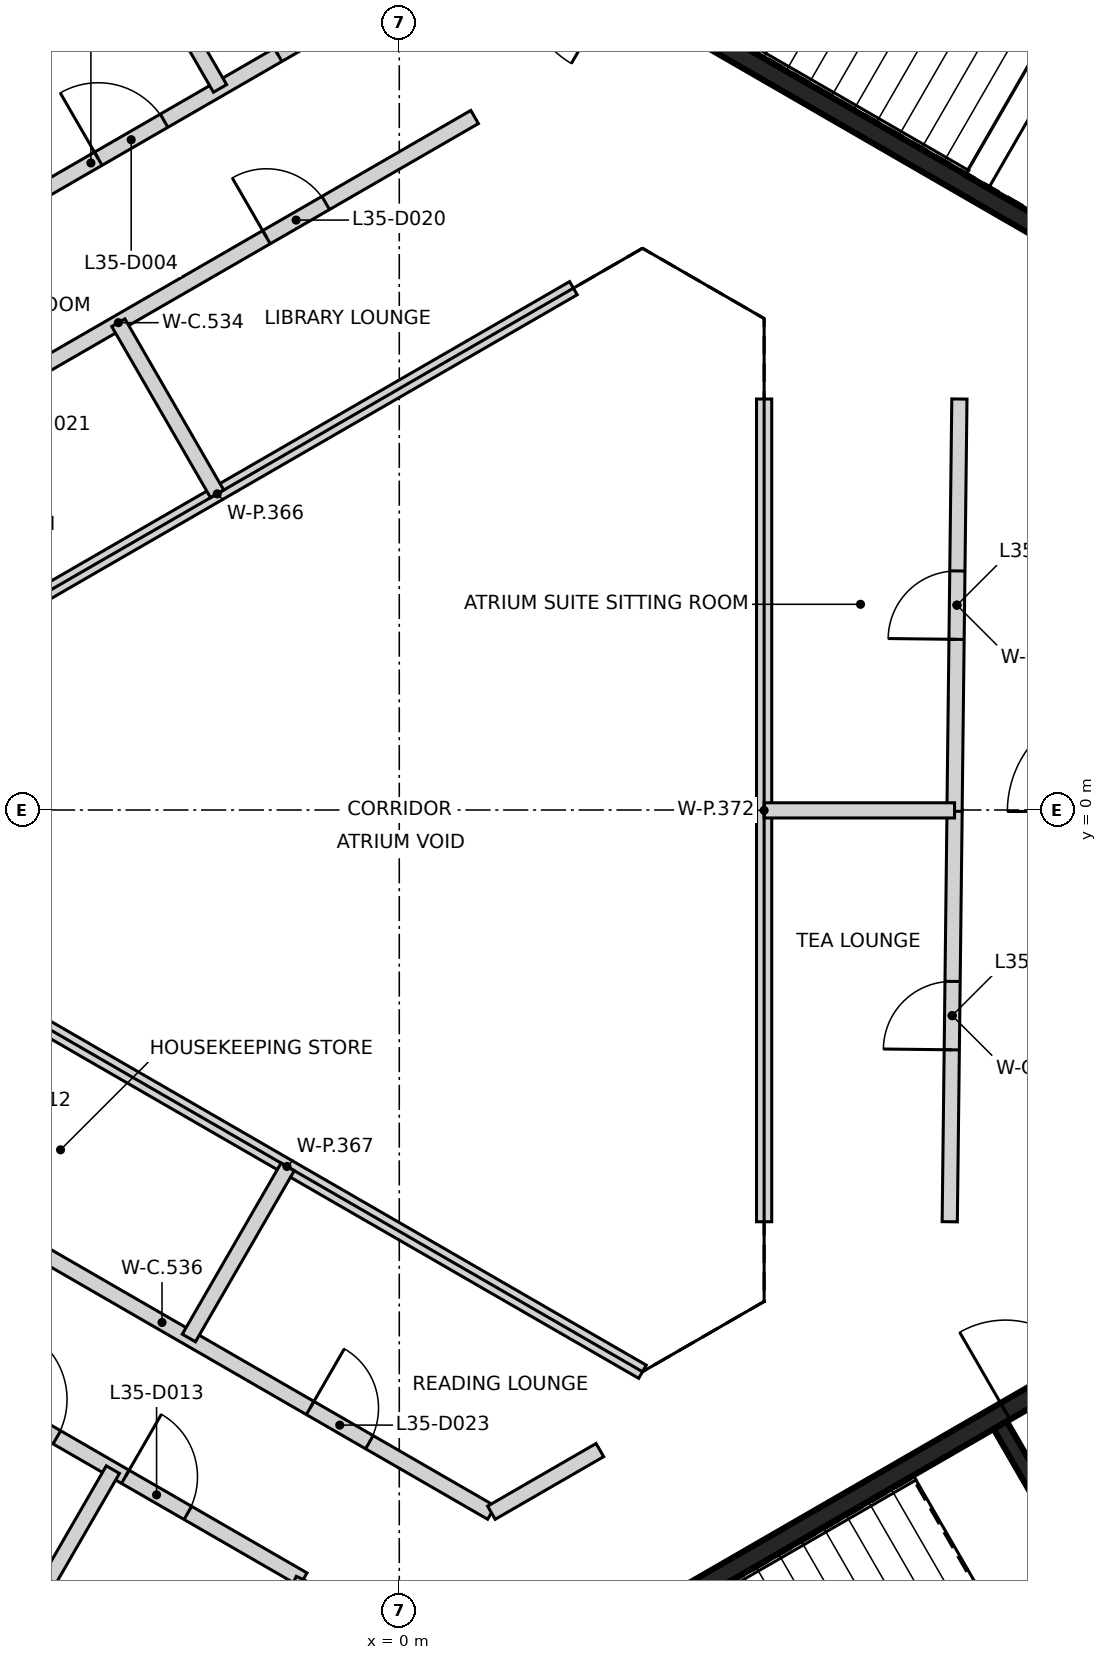
"""IFC4 building model, lengths in metres.
Left out: names, types, materials, properties, quantities, classifications, styles, units other than length and angle.
Written with IfcOpenShell. Run it as: python <this file> out.ifc"""

import sys

from ifc_helpers import new_model, si_unit, direction, frame, frame_2d, origin, place, context, subcontext, project, spatial, rectangle, extrude, element, fill, save


model = new_model("IFC4")
c1 = context("Model", 3, precision=1e-05, world=origin(), true_north=direction((0.0, 1.0)))
c2 = subcontext(c1, "Body", "Model", "MODEL_VIEW")
j1 = project(units=[si_unit("LENGTHUNIT", "METRE"), si_unit("PLANEANGLEUNIT", "RADIAN")], contexts=[c1])
p1 = place(None, origin())
s1 = spatial("IfcSite", under=j1, at=p1, CompositionType="ELEMENT")
p2 = place(p1, origin())
s2 = spatial("IfcBuilding", under=s1, at=p2, CompositionType="ELEMENT")
p3 = place(p2, frame((0.0, 0.0, 143.2)))
s3 = spatial("IfcBuildingStorey", under=s2, at=p3, CompositionType="ELEMENT", Elevation=143.2)
p4 = place(p3, frame((10.42, 6.498, 0.0), z_axis=(0.0, 0.0, 1.0), x_axis=(-0.866021906294, 0.500006057782, 0.0)))
e1 = element("IfcWall", 1, at=p4, inside=s3, PredefinedType="SHEAR", context=c2, shape_type="SweptSolid", body=[
    extrude(rectangle(XDim=11.55, YDim=0.25, at=frame_2d((5.775, 0.0))), origin(), (0.0, 0.0, 1.0), 3.2),
])
p5 = place(p4, frame((10.025, 0.0, 0.0)))
e2 = element("IfcOpeningElement", 2, at=p5, cuts=e1, PredefinedType="OPENING", context=c2, shape_type="SweptSolid", body=[
    extrude(rectangle(XDim=1.2, YDim=2.1, at=frame_2d((0.6, 1.05))), frame((0.0, 0.135, 0.0), z_axis=(0.0, -1.0, 0.0), x_axis=(1.0, 0.0, 0.0)), (0.0, 0.0, 1.0), 0.27),
])
p6 = place(p4, frame((8.725, 0.0, 0.0)))
e3 = element("IfcOpeningElement", 3, at=p6, cuts=e1, PredefinedType="OPENING", context=c2, shape_type="SweptSolid", body=[
    extrude(rectangle(XDim=1.2, YDim=2.1, at=frame_2d((0.6, 1.05))), frame((0.0, 0.135, 0.0), z_axis=(0.0, -1.0, 0.0), x_axis=(1.0, 0.0, 0.0)), (0.0, 0.0, 1.0), 0.27),
])
p7 = place(p3, frame((0.417, -12.273, 0.0), z_axis=(0.0, 0.0, 1.0), x_axis=(0.866021906294, 0.500006057782, 0.0)))
e4 = element("IfcWall", 4, at=p7, inside=s3, PredefinedType="SHEAR", context=c2, shape_type="SweptSolid", body=[
    extrude(rectangle(XDim=11.55, YDim=0.25, at=frame_2d((5.775, 0.0))), origin(), (0.0, 0.0, 1.0), 3.2),
])
p8 = place(p7, frame((10.025, 0.0, 0.0)))
e5 = element("IfcOpeningElement", 5, at=p8, cuts=e4, PredefinedType="OPENING", context=c2, shape_type="SweptSolid", body=[
    extrude(rectangle(XDim=1.2, YDim=2.1, at=frame_2d((0.6, 1.05))), frame((0.0, 0.135, 0.0), z_axis=(0.0, -1.0, 0.0), x_axis=(1.0, 0.0, 0.0)), (0.0, 0.0, 1.0), 0.27),
])
p9 = place(p7, frame((8.725, 0.0, 0.0)))
e6 = element("IfcOpeningElement", 6, at=p9, cuts=e4, PredefinedType="OPENING", context=c2, shape_type="SweptSolid", body=[
    extrude(rectangle(XDim=1.2, YDim=2.1, at=frame_2d((0.6, 1.05))), frame((0.0, 0.135, 0.0), z_axis=(0.0, -1.0, 0.0), x_axis=(1.0, 0.0, 0.0)), (0.0, 0.0, 1.0), 0.27),
])
p10 = place(p3, frame((7.906, -8.094, 0.0), z_axis=(0.0, 0.0, 1.0), x_axis=(0.500024287448, -0.866011380966, 0.0)))
e7 = element("IfcWall", 7, at=p10, inside=s3, PredefinedType="SHEAR", context=c2, shape_type="SweptSolid", body=[
    extrude(rectangle(XDim=5.251, YDim=0.2, at=frame_2d((2.625, 0.0))), origin(), (0.0, 0.0, 1.0), 3.2),
])
p11 = place(p10, frame((1.849, 0.0, 0.0)))
e8 = element("IfcOpeningElement", 8, at=p11, cuts=e7, PredefinedType="OPENING", context=c2, shape_type="SweptSolid", body=[
    extrude(rectangle(XDim=1.4, YDim=2.1, at=frame_2d((0.7, 1.05))), frame((0.0, 0.11, 0.0), z_axis=(0.0, -1.0, 0.0), x_axis=(1.0, 0.0, 0.0)), (0.0, 0.0, 1.0), 0.22),
])
p12 = place(p3, frame((-9.447, -5.4, 0.0), z_axis=(0.0, 0.0, 1.0), x_axis=(0.866101262146, -0.49986858644, 0.0)))
e9 = element("IfcWall", 9, at=p12, inside=s3, PredefinedType="PARTITIONING", context=c2, shape_type="SweptSolid", body=[
    extrude(rectangle(XDim=9.449, YDim=0.2, at=frame_2d((4.724, 0.0))), origin(), (0.0, 0.0, 1.0), 3.2),
])
p13 = place(p12, frame((2.718, 0.0, 0.0)))
e10 = element("IfcOpeningElement", 10, at=p13, cuts=e9, PredefinedType="OPENING", context=c2, shape_type="SweptSolid", body=[
    extrude(rectangle(XDim=0.95, YDim=2.1, at=frame_2d((0.475, 1.05))), frame((0.0, 0.11, 0.0), z_axis=(0.0, -1.0, 0.0), x_axis=(1.0, 0.0, 0.0)), (0.0, 0.0, 1.0), 0.22),
])
p14 = place(p12, frame((4.707, 0.0, 0.0)))
e11 = element("IfcOpeningElement", 11, at=p14, cuts=e9, PredefinedType="OPENING", context=c2, shape_type="SweptSolid", body=[
    extrude(rectangle(XDim=1.0, YDim=2.1, at=frame_2d((0.5, 1.05))), frame((0.0, 0.11, 0.0), z_axis=(0.0, -1.0, 0.0), x_axis=(1.0, 0.0, 0.0)), (0.0, 0.0, 1.0), 0.22),
])
p15 = place(p12, frame((6.746, 0.0, 0.0)))
e12 = element("IfcOpeningElement", 12, at=p15, cuts=e9, PredefinedType="OPENING", context=c2, shape_type="SweptSolid", body=[
    extrude(rectangle(XDim=0.95, YDim=2.1, at=frame_2d((0.475, 1.05))), frame((0.0, 0.11, 0.0), z_axis=(0.0, -1.0, 0.0), x_axis=(1.0, 0.0, 0.0)), (0.0, 0.0, 1.0), 0.22),
])
p16 = place(p3, frame((-8.382, 3.705, 0.0), z_axis=(0.0, 0.0, 1.0), x_axis=(0.866012036978, 0.500023151273, 0.0)))
e13 = element("IfcWall", 13, at=p16, inside=s3, PredefinedType="PARTITIONING", context=c2, shape_type="SweptSolid", body=[
    extrude(rectangle(XDim=10.823, YDim=0.2, at=frame_2d((5.412, 0.0))), origin(), (0.0, 0.0, 1.0), 3.2),
])
p17 = place(p16, frame((7.661, 0.0, 0.0)))
e14 = element("IfcOpeningElement", 14, at=p17, cuts=e13, PredefinedType="OPENING", context=c2, shape_type="SweptSolid", body=[
    extrude(rectangle(XDim=0.9, YDim=2.1, at=frame_2d((0.45, 1.05))), frame((0.0, 0.11, 0.0), z_axis=(0.0, -1.0, 0.0), x_axis=(1.0, 0.0, 0.0)), (0.0, 0.0, 1.0), 0.22),
])
p18 = place(p16, frame((2.261, 0.0, 0.0)))
e15 = element("IfcOpeningElement", 15, at=p18, cuts=e13, PredefinedType="OPENING", context=c2, shape_type="SweptSolid", body=[
    extrude(rectangle(XDim=0.9, YDim=2.1, at=frame_2d((0.45, 1.05))), frame((0.0, 0.11, 0.0), z_axis=(0.0, -1.0, 0.0), x_axis=(1.0, 0.0, 0.0)), (0.0, 0.0, 1.0), 0.22),
])
p19 = place(p3, frame((-8.161, 6.142, 0.0), z_axis=(0.0, 0.0, 1.0), x_axis=(0.865927304867, 0.500169873828, 0.0)))
e16 = element("IfcWall", 16, at=p19, inside=s3, PredefinedType="PARTITIONING", context=c2, shape_type="SweptSolid", body=[
    extrude(rectangle(XDim=9.478, YDim=0.2, at=frame_2d((4.739, 0.0))), origin(), (0.0, 0.0, 1.0), 3.2),
])
p20 = place(p19, frame((4.851, 0.0, 0.0)))
e17 = element("IfcOpeningElement", 17, at=p20, cuts=e16, PredefinedType="OPENING", context=c2, shape_type="SweptSolid", body=[
    extrude(rectangle(XDim=1.0, YDim=2.1, at=frame_2d((0.5, 1.05))), frame((0.0, 0.11, 0.0), z_axis=(0.0, -1.0, 0.0), x_axis=(1.0, 0.0, 0.0)), (0.0, 0.0, 1.0), 0.22),
])
p21 = place(p19, frame((7.583, 0.0, 0.0)))
e18 = element("IfcOpeningElement", 18, at=p21, cuts=e16, PredefinedType="OPENING", context=c2, shape_type="SweptSolid", body=[
    extrude(rectangle(XDim=1.0, YDim=2.1, at=frame_2d((0.5, 1.05))), frame((0.0, 0.11, 0.0), z_axis=(0.0, -1.0, 0.0), x_axis=(1.0, 0.0, 0.0)), (0.0, 0.0, 1.0), 0.22),
])
p22 = place(p3, frame((-7.455, -4.24, 0.0), z_axis=(0.0, 0.0, 1.0), x_axis=(0.866015783746, -0.500016662025, 0.0)))
e19 = element("IfcWall", 19, at=p22, inside=s3, PredefinedType="PARTITIONING", context=c2, shape_type="SweptSolid", body=[
    extrude(rectangle(XDim=10.009, YDim=0.2, at=frame_2d((5.004, 0.0))), origin(), (0.0, 0.0, 1.0), 3.2),
])
p23 = place(p22, frame((2.262, 0.0, 0.0)))
e20 = element("IfcOpeningElement", 20, at=p23, cuts=e19, PredefinedType="OPENING", context=c2, shape_type="SweptSolid", body=[
    extrude(rectangle(XDim=0.9, YDim=2.1, at=frame_2d((0.45, 1.05))), frame((0.0, 0.11, 0.0), z_axis=(0.0, -1.0, 0.0), x_axis=(1.0, 0.0, 0.0)), (0.0, 0.0, 1.0), 0.22),
])
p24 = place(p22, frame((7.254, 0.0, 0.0)))
e21 = element("IfcOpeningElement", 21, at=p24, cuts=e19, PredefinedType="OPENING", context=c2, shape_type="SweptSolid", body=[
    extrude(rectangle(XDim=0.9, YDim=2.1, at=frame_2d((0.45, 1.05))), frame((0.0, 0.11, 0.0), z_axis=(0.0, -1.0, 0.0), x_axis=(1.0, 0.0, 0.0)), (0.0, 0.0, 1.0), 0.22),
])
p25 = place(p3, frame((-2.162, -12.041, 0.0), z_axis=(0.0, 0.0, 1.0), x_axis=(0.424280226728, 0.905530943264, 0.0)))
e22 = element("IfcWall", 22, at=p25, inside=s3, PredefinedType="PARTITIONING", context=c2, shape_type="SweptSolid", body=[
    extrude(rectangle(XDim=2.117, YDim=0.2, at=frame_2d((1.059, 0.0))), origin(), (0.0, 0.0, 1.0), 3.2),
])
p26 = place(p3, frame((1.212, -9.245, 0.0), z_axis=(0.0, 0.0, 1.0), x_axis=(0.86593636949, 0.500154180222, 0.0)))
e23 = element("IfcWall", 23, at=p26, inside=s3, PredefinedType="PARTITIONING", context=c2, shape_type="SweptSolid", body=[
    extrude(rectangle(XDim=1.648, YDim=0.2, at=frame_2d((0.824, 0.0))), origin(), (0.0, 0.0, 1.0), 3.2),
])
p27 = place(p3, frame((7.242, -5.417, 0.0), z_axis=(0.0, 0.0, 1.0), x_axis=(0.01179195138, 0.999930472524, 0.0)))
e24 = element("IfcWall", 24, at=p27, inside=s3, PredefinedType="PARTITIONING", context=c2, shape_type="SweptSolid", body=[
    extrude(rectangle(XDim=5.425, YDim=0.2, at=frame_2d((2.712, 0.0))), origin(), (0.0, 0.0, 1.0), 3.2),
])
p28 = place(p27, frame((2.262, 0.0, 0.0)))
e25 = element("IfcOpeningElement", 25, at=p28, cuts=e24, PredefinedType="OPENING", context=c2, shape_type="SweptSolid", body=[
    extrude(rectangle(XDim=0.9, YDim=2.1, at=frame_2d((0.45, 1.05))), frame((0.0, 0.11, 0.0), z_axis=(0.0, -1.0, 0.0), x_axis=(1.0, 0.0, 0.0)), (0.0, 0.0, 1.0), 0.22),
])
p29 = place(p3, frame((7.305, -0.017, 0.0), z_axis=(0.0, 0.0, 1.0), x_axis=(0.01179195138, 0.999930472524, 0.0)))
e26 = element("IfcWall", 26, at=p29, inside=s3, PredefinedType="PARTITIONING", context=c2, shape_type="SweptSolid", body=[
    extrude(rectangle(XDim=5.425, YDim=0.2, at=frame_2d((2.712, 0.0))), origin(), (0.0, 0.0, 1.0), 3.2),
])
p30 = place(p29, frame((2.262, 0.0, 0.0)))
e27 = element("IfcOpeningElement", 27, at=p30, cuts=e26, PredefinedType="OPENING", context=c2, shape_type="SweptSolid", body=[
    extrude(rectangle(XDim=0.9, YDim=2.1, at=frame_2d((0.45, 1.05))), frame((0.0, 0.11, 0.0), z_axis=(0.0, -1.0, 0.0), x_axis=(1.0, 0.0, 0.0)), (0.0, 0.0, 1.0), 0.22),
])
p31 = place(p3, frame((-9.882, -19.267, 0.0), z_axis=(0.0, 0.0, 1.0), x_axis=(0.499993811829, 0.866028976497, 0.0)))
e28 = element("IfcWall", 28, at=p31, inside=s3, PredefinedType="PARTITIONING", context=c2, shape_type="SweptSolid", body=[
    extrude(rectangle(XDim=12.227, YDim=0.2, at=frame_2d((6.114, 0.0))), origin(), (0.0, 0.0, 1.0), 2.3),
])
p32 = place(p3, frame((-8.468, 20.076, 0.0), z_axis=(0.0, 0.0, 1.0), x_axis=(0.499961688474, -0.866047521824, 0.0)))
e29 = element("IfcWall", 29, at=p32, inside=s3, PredefinedType="PARTITIONING", context=c2, shape_type="SweptSolid", body=[
    extrude(rectangle(XDim=12.22, YDim=0.2, at=frame_2d((6.11, 0.0))), origin(), (0.0, 0.0, 1.0), 2.3),
])
p33 = place(p3, frame((-7.082, 1.453, 0.0), z_axis=(0.0, 0.0, 1.0), x_axis=(0.866010525116, 0.500025769724, 0.0)))
e30 = element("IfcWall", 30, at=p33, inside=s3, PredefinedType="PARTITIONING", context=c2, shape_type="SweptSolid", body=[
    extrude(rectangle(XDim=10.823, YDim=0.2, at=frame_2d((5.411, 0.0))), origin(), (0.0, 0.0, 1.0), 2.3),
])
p34 = place(p3, frame((-6.155, -1.989, 0.0), z_axis=(0.0, 0.0, 1.0), x_axis=(0.866009062299, -0.500028303215, 0.0)))
e31 = element("IfcWall", 31, at=p34, inside=s3, PredefinedType="PARTITIONING", context=c2, shape_type="SweptSolid", body=[
    extrude(rectangle(XDim=10.802, YDim=0.2, at=frame_2d((5.401, 0.0))), origin(), (0.0, 0.0, 1.0), 2.3),
])
p35 = place(p3, frame((-3.696, 6.411, 0.0), z_axis=(0.0, 0.0, 1.0), x_axis=(0.500006934395, -0.866021400173, 0.0)))
e32 = element("IfcWall", 32, at=p35, inside=s3, PredefinedType="PARTITIONING", context=c2, shape_type="SweptSolid", body=[
    extrude(rectangle(XDim=2.6, YDim=0.2, at=frame_2d((1.3, 0.0))), origin(), (0.0, 0.0, 1.0), 2.3),
])
p36 = place(p3, frame((-2.768, -6.946, 0.0), z_axis=(0.0, 0.0, 1.0), x_axis=(0.500017832597, 0.866015107885, 0.0)))
e33 = element("IfcWall", 33, at=p36, inside=s3, PredefinedType="PARTITIONING", context=c2, shape_type="SweptSolid", body=[
    extrude(rectangle(XDim=2.6, YDim=0.2, at=frame_2d((1.3, 0.0))), origin(), (0.0, 0.0, 1.0), 2.3),
])
p37 = place(p3, frame((4.8, -5.417, 0.0), z_axis=(0.0, 0.0, 1.0), x_axis=(0.0, 1.0, 0.0)))
e34 = element("IfcWall", 34, at=p37, inside=s3, PredefinedType="PARTITIONING", context=c2, shape_type="SweptSolid", body=[
    extrude(rectangle(XDim=10.824, YDim=0.2, at=frame_2d((5.412, 0.0))), origin(), (0.0, 0.0, 1.0), 2.3),
])
p38 = place(p3, frame((4.8, -0.005, 0.0), z_axis=(0.0, 0.0, 1.0), x_axis=(1.0, 0.0, 0.0)))
e35 = element("IfcWall", 35, at=p38, inside=s3, PredefinedType="PARTITIONING", context=c2, shape_type="SweptSolid", body=[
    extrude(rectangle(XDim=2.505, YDim=0.2, at=frame_2d((1.252, 0.0))), origin(), (0.0, 0.0, 1.0), 2.3),
])
p39 = place(p9, origin())
e36 = element("IfcDoor", 36, at=p39, inside=s3, OperationType="SINGLE_SWING_RIGHT", PredefinedType="DOOR", context=c2, shape_type="SweptSolid", body=[
    extrude(rectangle(XDim=1.2, YDim=2.1, at=frame_2d((0.6, 1.05))), frame((0.0, 0.025, 0.0), z_axis=(0.0, -1.0, 0.0), x_axis=(1.0, 0.0, 0.0)), (0.0, 0.0, 1.0), 0.05),
])
fill(e6, e36)
p40 = place(p20, origin())
e37 = element("IfcDoor", 37, at=p40, inside=s3, OperationType="SINGLE_SWING_LEFT", PredefinedType="DOOR", context=c2, shape_type="SweptSolid", body=[
    extrude(rectangle(XDim=1.0, YDim=2.1, at=frame_2d((0.5, 1.05))), frame((0.0, 0.025, 0.0), z_axis=(0.0, -1.0, 0.0), x_axis=(1.0, 0.0, 0.0)), (0.0, 0.0, 1.0), 0.05),
])
fill(e17, e37)
p41 = place(p21, origin())
e38 = element("IfcDoor", 38, at=p41, inside=s3, OperationType="SINGLE_SWING_LEFT", PredefinedType="DOOR", context=c2, shape_type="SweptSolid", body=[
    extrude(rectangle(XDim=1.0, YDim=2.1, at=frame_2d((0.5, 1.05))), frame((0.0, 0.025, 0.0), z_axis=(0.0, -1.0, 0.0), x_axis=(1.0, 0.0, 0.0)), (0.0, 0.0, 1.0), 0.05),
])
fill(e18, e38)
p42 = place(p14, frame((1.0, 0.0, 0.0), z_axis=(0.0, 0.0, 1.0), x_axis=(-1.0, 0.0, 0.0)))
e39 = element("IfcDoor", 39, at=p42, inside=s3, OperationType="SINGLE_SWING_LEFT", PredefinedType="DOOR", context=c2, shape_type="SweptSolid", body=[
    extrude(rectangle(XDim=1.0, YDim=2.1, at=frame_2d((0.5, 1.05))), frame((0.0, 0.025, 0.0), z_axis=(0.0, -1.0, 0.0), x_axis=(1.0, 0.0, 0.0)), (0.0, 0.0, 1.0), 0.05),
])
fill(e11, e39)
p43 = place(p15, frame((0.95, 0.0, 0.0), z_axis=(0.0, 0.0, 1.0), x_axis=(-1.0, 0.0, 0.0)))
e40 = element("IfcDoor", 40, at=p43, inside=s3, OperationType="SINGLE_SWING_LEFT", PredefinedType="DOOR", context=c2, shape_type="SweptSolid", body=[
    extrude(rectangle(XDim=0.95, YDim=2.1, at=frame_2d((0.475, 1.05))), frame((0.0, 0.025, 0.0), z_axis=(0.0, -1.0, 0.0), x_axis=(1.0, 0.0, 0.0)), (0.0, 0.0, 1.0), 0.05),
])
fill(e12, e40)
p44 = place(p28, origin())
e41 = element("IfcDoor", 41, at=p44, inside=s3, OperationType="SINGLE_SWING_LEFT", PredefinedType="DOOR", context=c2, shape_type="SweptSolid", body=[
    extrude(rectangle(XDim=0.9, YDim=2.1, at=frame_2d((0.45, 1.05))), frame((0.0, 0.025, 0.0), z_axis=(0.0, -1.0, 0.0), x_axis=(1.0, 0.0, 0.0)), (0.0, 0.0, 1.0), 0.05),
])
fill(e25, e41)
p45 = place(p30, origin())
e42 = element("IfcDoor", 42, at=p45, inside=s3, OperationType="SINGLE_SWING_LEFT", PredefinedType="DOOR", context=c2, shape_type="SweptSolid", body=[
    extrude(rectangle(XDim=0.9, YDim=2.1, at=frame_2d((0.45, 1.05))), frame((0.0, 0.025, 0.0), z_axis=(0.0, -1.0, 0.0), x_axis=(1.0, 0.0, 0.0)), (0.0, 0.0, 1.0), 0.05),
])
fill(e27, e42)
p46 = place(p17, frame((0.9, 0.0, 0.0), z_axis=(0.0, 0.0, 1.0), x_axis=(-1.0, 0.0, 0.0)))
e43 = element("IfcDoor", 43, at=p46, inside=s3, OperationType="SINGLE_SWING_LEFT", PredefinedType="DOOR", context=c2, shape_type="SweptSolid", body=[
    extrude(rectangle(XDim=0.9, YDim=2.1, at=frame_2d((0.45, 1.05))), frame((0.0, 0.025, 0.0), z_axis=(0.0, -1.0, 0.0), x_axis=(1.0, 0.0, 0.0)), (0.0, 0.0, 1.0), 0.05),
])
fill(e14, e43)
p47 = place(p24, origin())
e44 = element("IfcDoor", 44, at=p47, inside=s3, OperationType="SINGLE_SWING_LEFT", PredefinedType="DOOR", context=c2, shape_type="SweptSolid", body=[
    extrude(rectangle(XDim=0.9, YDim=2.1, at=frame_2d((0.45, 1.05))), frame((0.0, 0.025, 0.0), z_axis=(0.0, -1.0, 0.0), x_axis=(1.0, 0.0, 0.0)), (0.0, 0.0, 1.0), 0.05),
])
fill(e21, e44)
save(model, sys.argv[1])
